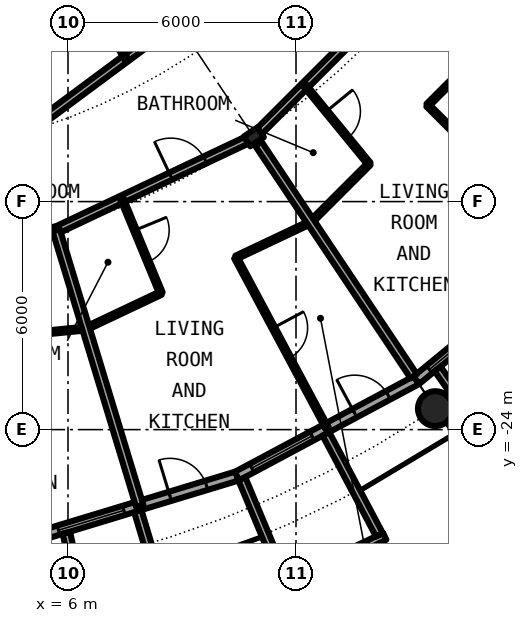
"""IFC4 building model, lengths in metres.
Left out: names, types, materials, properties, quantities, classifications, styles, units other than length and angle.
Written with IfcOpenShell. Run it as: python <this file> out.ifc"""

import sys

from ifc_helpers import new_model, si_unit, direction, frame, frame_2d, origin, origin_2d, place, context, subcontext, project, spatial, rectangle, circle, hollow_circle, i_section, extrude, element, fill, save


model = new_model("IFC4")
c1 = context("Model", 3, precision=1e-05, world=origin(), true_north=direction((0.0, 1.0)))
c2 = subcontext(c1, "Body", "Model", "MODEL_VIEW")
j1 = project(units=[si_unit("LENGTHUNIT", "METRE"), si_unit("PLANEANGLEUNIT", "RADIAN")], contexts=[c1])
p1 = place(None, origin())
s1 = spatial("IfcSite", under=j1, at=p1, CompositionType="ELEMENT")
p2 = place(p1, origin())
s2 = spatial("IfcBuilding", under=s1, at=p2, CompositionType="ELEMENT")
p3 = place(p2, frame((0.0, 0.0, 117.75)))
s3 = spatial("IfcBuildingStorey", under=s2, at=p3, CompositionType="ELEMENT", Elevation=117.75)
p4 = place(p3, frame((15.667, -23.448, 0.0), z_axis=(0.0, 0.0, 1.0), x_axis=(1.0, 0.0, 0.0)))
e1 = element("IfcColumn", 1, at=p4, inside=s3, PredefinedType="COLUMN", context=c2, shape_type="SweptSolid", body=[
    extrude(hollow_circle(Radius=0.457, WallThickness=0.04, at=origin_2d()), origin(), (0.0, 0.0, 1.0), 3.05),
])
p5 = place(p3, frame((10.889, -16.297, 0.0), z_axis=(0.0, 0.0, 1.0), x_axis=(0.55557023302, -0.831469612303, 0.0)))
e2 = element("IfcColumn", 2, at=p5, inside=s3, PredefinedType="COLUMN", context=c2, shape_type="SweptSolid", body=[
    extrude(i_section(OverallWidth=0.307, OverallDepth=0.432, WebThickness=0.021, FlangeThickness=0.04, FilletRadius=0.027, at=origin_2d()), origin(), (0.0, 0.0, 1.0), 3.05),
])
p6 = place(p3, frame((5.326, -26.775, 0.0), z_axis=(0.0, 0.0, 1.0), x_axis=(0.956965678721, 0.290201119486, 0.0)))
e3 = element("IfcWall", 3, at=p6, inside=s3, PredefinedType="SOLIDWALL", context=c2, shape_type="SweptSolid", body=[
    extrude(rectangle(XDim=5.351, YDim=0.25, at=frame_2d((2.676, 0.0))), origin(), (0.0, 0.0, 1.0), 2.7),
])
p7 = place(p6, frame((0.441, 0.0, 0.3)))
e4 = element("IfcOpeningElement", 4, at=p7, cuts=e3, PredefinedType="OPENING", context=c2, shape_type="SweptSolid", body=[
    extrude(rectangle(XDim=1.8, YDim=2.1, at=frame_2d((0.9, 1.05))), frame((0.0, 0.135, 0.0), z_axis=(0.0, -1.0, 0.0), x_axis=(1.0, 0.0, 0.0)), (0.0, 0.0, 1.0), 0.27),
])
p8 = place(p6, frame((3.51, 0.0, 0.0)))
e5 = element("IfcOpeningElement", 5, at=p8, cuts=e3, PredefinedType="OPENING", context=c2, shape_type="SweptSolid", body=[
    extrude(rectangle(XDim=1.0, YDim=2.2, at=frame_2d((0.5, 1.1))), frame((0.0, 0.135, 0.0), z_axis=(0.0, -1.0, 0.0), x_axis=(1.0, 0.0, 0.0)), (0.0, 0.0, 1.0), 0.27),
])
p9 = place(p3, frame((5.957, -26.715, -0.03), z_axis=(0.0, 0.0, 1.0), x_axis=(0.217857287091, -0.975980636315, 0.0)))
e6 = element("IfcWall", 6, at=p9, inside=s3, PredefinedType="SOLIDWALL", context=c2, shape_type="SweptSolid", body=[
    extrude(rectangle(XDim=2.928, YDim=0.2, at=frame_2d((1.464, 0.0))), origin(), (0.0, 0.0, 1.0), 2.73),
])
p10 = place(p3, frame((7.837, -26.144, -0.03), z_axis=(0.0, 0.0, 1.0), x_axis=(0.287064767992, -0.957911174889, 0.0)))
e7 = element("IfcWall", 7, at=p10, inside=s3, PredefinedType="SOLIDWALL", context=c2, shape_type="SweptSolid", body=[
    extrude(rectangle(XDim=3.006, YDim=0.2, at=frame_2d((1.503, 0.0))), origin(), (0.0, 0.0, 1.0), 2.73),
])
p11 = place(p3, frame((10.447, -25.222, 0.0), z_axis=(0.0, 0.0, 1.0), x_axis=(0.881915646801, 0.471407246368, 0.0)))
e8 = element("IfcWall", 8, at=p11, inside=s3, PredefinedType="SOLIDWALL", context=c2, shape_type="SweptSolid", body=[
    extrude(rectangle(XDim=5.352, YDim=0.25, at=frame_2d((2.676, 0.0))), origin(), (0.0, 0.0, 1.0), 2.7),
])
p12 = place(p11, frame((0.441, 0.0, 0.3)))
e9 = element("IfcOpeningElement", 9, at=p12, cuts=e8, PredefinedType="OPENING", context=c2, shape_type="SweptSolid", body=[
    extrude(rectangle(XDim=1.8, YDim=2.1, at=frame_2d((0.9, 1.05))), frame((0.0, 0.135, 0.0), z_axis=(0.0, -1.0, 0.0), x_axis=(1.0, 0.0, 0.0)), (0.0, 0.0, 1.0), 0.27),
])
p13 = place(p11, frame((3.51, 0.0, 0.0)))
e10 = element("IfcOpeningElement", 10, at=p13, cuts=e8, PredefinedType="OPENING", context=c2, shape_type="SweptSolid", body=[
    extrude(rectangle(XDim=1.0, YDim=2.2, at=frame_2d((0.5, 1.1))), frame((0.0, 0.135, 0.0), z_axis=(0.0, -1.0, 0.0), x_axis=(1.0, 0.0, 0.0)), (0.0, 0.0, 1.0), 0.27),
])
p14 = place(p3, frame((11.629, -28.088, -0.03), z_axis=(0.0, 0.0, 1.0), x_axis=(0.904000060331, 0.427532327342, 0.0)))
e11 = element("IfcWall", 11, at=p14, inside=s3, PredefinedType="SOLIDWALL", context=c2, shape_type="SweptSolid", body=[
    extrude(rectangle(XDim=2.993, YDim=0.2, at=frame_2d((1.497, 0.0))), origin(), (0.0, 0.0, 1.0), 2.73),
])
p15 = place(p14, frame((0.457, 0.0, 0.33)))
e12 = element("IfcOpeningElement", 12, at=p15, cuts=e11, PredefinedType="OPENING", context=c2, shape_type="SweptSolid", body=[
    extrude(circle(Radius=1.04, at=frame_2d((1.04, 1.04))), frame((0.0, 0.11, 0.0), z_axis=(0.0, -1.0, 0.0), x_axis=(1.0, 0.0, 0.0)), (0.0, 0.0, 1.0), 0.22),
])
p16 = place(p3, frame((10.575, -25.295, -0.03), z_axis=(0.0, 0.0, 1.0), x_axis=(0.385697364644, -0.922625353492, 0.0)))
e13 = element("IfcWall", 13, at=p16, inside=s3, PredefinedType="SOLIDWALL", context=c2, shape_type="SweptSolid", body=[
    extrude(rectangle(XDim=2.883, YDim=0.2, at=frame_2d((1.442, 0.0))), origin(), (0.0, 0.0, 1.0), 2.73),
])
p17 = place(p3, frame((12.787, -24.113, -0.03), z_axis=(0.0, 0.0, 1.0), x_axis=(0.468365282436, -0.883534924159, 0.0)))
e14 = element("IfcWall", 14, at=p17, inside=s3, PredefinedType="SOLIDWALL", context=c2, shape_type="SweptSolid", body=[
    extrude(rectangle(XDim=3.006, YDim=0.2, at=frame_2d((1.503, 0.0))), origin(), (0.0, 0.0, 1.0), 2.73),
])
p18 = place(p3, frame((15.167, -22.699, 0.0), z_axis=(0.0, 0.0, 1.0), x_axis=(0.773019449054, 0.634382322723, 0.0)))
e15 = element("IfcWall", 15, at=p18, inside=s3, PredefinedType="SOLIDWALL", context=c2, shape_type="SweptSolid", body=[
    extrude(rectangle(XDim=5.352, YDim=0.25, at=frame_2d((2.676, 0.0))), origin(), (0.0, 0.0, 1.0), 2.7),
])
p19 = place(p18, frame((0.441, 0.0, 0.3)))
e16 = element("IfcOpeningElement", 16, at=p19, cuts=e15, PredefinedType="OPENING", context=c2, shape_type="SweptSolid", body=[
    extrude(rectangle(XDim=1.8, YDim=2.1, at=frame_2d((0.9, 1.05))), frame((0.0, 0.135, 0.0), z_axis=(0.0, -1.0, 0.0), x_axis=(1.0, 0.0, 0.0)), (0.0, 0.0, 1.0), 0.27),
])
p20 = place(p18, frame((3.51, 0.0, 0.0)))
e17 = element("IfcOpeningElement", 17, at=p20, cuts=e15, PredefinedType="OPENING", context=c2, shape_type="SweptSolid", body=[
    extrude(rectangle(XDim=1.0, YDim=2.2, at=frame_2d((0.5, 1.1))), frame((0.0, 0.135, 0.0), z_axis=(0.0, -1.0, 0.0), x_axis=(1.0, 0.0, 0.0)), (0.0, 0.0, 1.0), 0.27),
])
p21 = place(p3, frame((15.726, -22.402, -0.03), z_axis=(0.0, 0.0, 1.0), x_axis=(0.574826383135, -0.818275399393, 0.0)))
e18 = element("IfcWall", 18, at=p21, inside=s3, PredefinedType="SOLIDWALL", context=c2, shape_type="SweptSolid", body=[
    extrude(rectangle(XDim=2.929, YDim=0.2, at=frame_2d((1.465, 0.0))), origin(), (0.0, 0.0, 1.0), 2.73),
])
p22 = place(p3, frame((6.473, -21.34, 0.0), z_axis=(0.0, 0.0, 1.0), x_axis=(0.903929143338, 0.427682246328, 0.0)))
e19 = element("IfcWall", 19, at=p22, inside=s3, PredefinedType="PARTITIONING", context=c2, shape_type="SweptSolid", body=[
    extrude(rectangle(XDim=2.182, YDim=0.1, at=frame_2d((1.091, 0.0))), origin(), (0.0, 0.0, 1.0), 2.7),
])
p23 = place(p3, frame((10.425, -19.47, 0.0), z_axis=(0.0, 0.0, 1.0), x_axis=(0.903951937529, 0.427634066274, 0.0)))
e20 = element("IfcWall", 20, at=p23, inside=s3, PredefinedType="PARTITIONING", context=c2, shape_type="SweptSolid", body=[
    extrude(rectangle(XDim=2.181, YDim=0.1, at=frame_2d((1.091, 0.0))), origin(), (0.0, 0.0, 1.0), 2.7),
])
p24 = place(p3, frame((4.311, -21.553, 0.0), z_axis=(0.0, 0.0, 1.0), x_axis=(0.995195976339, 0.097902853268, 0.0)))
e21 = element("IfcWall", 21, at=p24, inside=s3, PredefinedType="PARTITIONING", context=c2, shape_type="SweptSolid", body=[
    extrude(rectangle(XDim=2.175, YDim=0.1, at=frame_2d((1.087, 0.0))), origin(), (0.0, 0.0, 1.0), 2.7),
])
p25 = place(p3, frame((12.389, -18.542, 0.0), z_axis=(0.0, 0.0, 1.0), x_axis=(0.707106781187, 0.707106781187, 0.0)))
e22 = element("IfcWall", 22, at=p25, inside=s3, PredefinedType="PARTITIONING", context=c2, shape_type="SweptSolid", body=[
    extrude(rectangle(XDim=2.175, YDim=0.1, at=frame_2d((1.088, 0.0))), origin(), (0.0, 0.0, 1.0), 2.7),
])
p26 = place(p3, frame((15.468, -15.463, 0.0), z_axis=(0.0, 0.0, 1.0), x_axis=(0.707106781187, 0.707106781187, 0.0)))
e23 = element("IfcWall", 23, at=p26, inside=s3, PredefinedType="PARTITIONING", context=c2, shape_type="SweptSolid", body=[
    extrude(rectangle(XDim=4.351, YDim=0.1, at=frame_2d((2.176, 0.0))), origin(), (0.0, 0.0, 1.0), 2.7),
])
p27 = place(p26, frame((2.808, 0.0, 0.0)))
e24 = element("IfcOpeningElement", 24, at=p27, cuts=e23, PredefinedType="OPENING", context=c2, shape_type="SweptSolid", body=[
    extrude(rectangle(XDim=0.9, YDim=2.3, at=frame_2d((0.45, 1.15))), frame((0.0, 0.06, 0.0), z_axis=(0.0, -1.0, 0.0), x_axis=(1.0, 0.0, 0.0)), (0.0, 0.0, 1.0), 0.12),
])
p28 = place(p3, frame((5.686, -18.758, 0.0), z_axis=(0.0, 0.0, 1.0), x_axis=(0.903961383505, 0.427614098379, 0.0)))
e25 = element("IfcWall", 25, at=p28, inside=s3, PredefinedType="PARTITIONING", context=c2, shape_type="SweptSolid", body=[
    extrude(rectangle(XDim=5.601, YDim=0.2, at=frame_2d((2.8, 0.0))), origin(), (0.0, 0.0, 1.0), 2.39),
])
p29 = place(p28, frame((3.339, 0.0, 0.0)))
e26 = element("IfcOpeningElement", 26, at=p29, cuts=e25, PredefinedType="OPENING", context=c2, shape_type="SweptSolid", body=[
    extrude(rectangle(XDim=1.0, YDim=2.3, at=frame_2d((0.5, 1.15))), frame((0.0, 0.11, 0.0), z_axis=(0.0, -1.0, 0.0), x_axis=(1.0, 0.0, 0.0)), (0.0, 0.0, 1.0), 0.22),
])
p30 = place(p3, frame((-1.921, -19.506, 0.0), z_axis=(0.0, 0.0, 1.0), x_axis=(0.995172982325, 0.098136309541, 0.0)))
e27 = element("IfcWall", 27, at=p30, inside=s3, PredefinedType="PARTITIONING", context=c2, shape_type="SweptSolid", body=[
    extrude(rectangle(XDim=7.655, YDim=0.2, at=frame_2d((3.827, 0.0))), origin(), (0.0, 0.0, 1.0), 2.39),
])
p31 = place(p30, frame((2.368, 0.0, 0.0)))
e28 = element("IfcOpeningElement", 28, at=p31, cuts=e27, PredefinedType="OPENING", context=c2, shape_type="SweptSolid", body=[
    extrude(rectangle(XDim=1.0, YDim=2.3, at=frame_2d((0.5, 1.15))), frame((0.0, 0.11, 0.0), z_axis=(0.0, -1.0, 0.0), x_axis=(1.0, 0.0, 0.0)), (0.0, 0.0, 1.0), 0.22),
])
p32 = place(p3, frame((11.0, -16.186, 0.0), z_axis=(0.0, 0.0, 1.0), x_axis=(0.707106781187, 0.707106781187, 0.0)))
e29 = element("IfcWall", 29, at=p32, inside=s3, PredefinedType="PARTITIONING", context=c2, shape_type="SweptSolid", body=[
    extrude(rectangle(XDim=7.334, YDim=0.2, at=frame_2d((3.667, 0.0))), origin(), (0.0, 0.0, 1.0), 2.39),
])
p33 = place(p32, frame((4.123, 0.0, 0.0)))
e30 = element("IfcOpeningElement", 30, at=p33, cuts=e29, PredefinedType="OPENING", context=c2, shape_type="SweptSolid", body=[
    extrude(rectangle(XDim=1.0, YDim=2.3, at=frame_2d((0.5, 1.15))), frame((0.0, 0.11, 0.0), z_axis=(0.0, -1.0, 0.0), x_axis=(1.0, 0.0, 0.0)), (0.0, 0.0, 1.0), 0.22),
])
p34 = place(p3, frame((4.906, -16.172, 0.0), z_axis=(0.0, 0.0, 1.0), x_axis=(0.803204584823, 0.59570327758, 0.0)))
e31 = element("IfcWall", 31, at=p34, inside=s3, PredefinedType="PARTITIONING", context=c2, shape_type="SweptSolid", body=[
    extrude(rectangle(XDim=11.387, YDim=0.2, at=frame_2d((5.693, 0.0))), origin(), (0.0, 0.0, 1.0), 2.7),
])
p35 = place(p34, frame((4.38, 0.0, 0.0)))
e32 = element("IfcOpeningElement", 32, at=p35, cuts=e31, PredefinedType="OPENING", context=c2, shape_type="SweptSolid", body=[
    extrude(rectangle(XDim=1.0, YDim=2.3, at=frame_2d((0.5, 1.15))), frame((0.0, 0.11, 0.0), z_axis=(0.0, -1.0, 0.0), x_axis=(1.0, 0.0, 0.0)), (0.0, 0.0, 1.0), 0.22),
])
p36 = place(p3, frame((5.689, -18.756, 0.0), z_axis=(0.0, 0.0, 1.0), x_axis=(0.290294523619, -0.956937348815, 0.0)))
e33 = element("IfcWall", 33, at=p36, inside=s3, PredefinedType="PARTITIONING", context=c2, shape_type="SweptSolid", body=[
    extrude(rectangle(XDim=7.575, YDim=0.2, at=frame_2d((3.788, 0.0))), origin(), (0.0, 0.0, 1.0), 2.7),
])
p37 = place(p3, frame((6.316, -11.961, 0.0), z_axis=(0.0, 0.0, 1.0), x_axis=(0.467037016128, -0.884237765291, 0.0)))
e34 = element("IfcWall", 34, at=p37, inside=s3, PredefinedType="PARTITIONING", context=c2, shape_type="SweptSolid", body=[
    extrude(rectangle(XDim=2.572, YDim=0.1, at=frame_2d((1.286, 0.0))), origin(), (0.0, 0.0, 1.0), 2.7),
])
p38 = place(p3, frame((7.423, -17.936, 0.0), z_axis=(0.0, 0.0, 1.0), x_axis=(0.382195876364, -0.924081334132, 0.0)))
e35 = element("IfcWall", 35, at=p38, inside=s3, PredefinedType="PARTITIONING", context=c2, shape_type="SweptSolid", body=[
    extrude(rectangle(XDim=2.674, YDim=0.1, at=frame_2d((1.337, 0.0))), origin(), (0.0, 0.0, 1.0), 2.7),
])
p39 = place(p38, frame((0.887, 0.0, 0.0)))
e36 = element("IfcOpeningElement", 36, at=p39, cuts=e35, PredefinedType="OPENING", context=c2, shape_type="SweptSolid", body=[
    extrude(rectangle(XDim=0.9, YDim=2.3, at=frame_2d((0.45, 1.15))), frame((0.0, 0.06, 0.0), z_axis=(0.0, -1.0, 0.0), x_axis=(1.0, 0.0, 0.0)), (0.0, 0.0, 1.0), 0.12),
])
p40 = place(p3, frame((10.417, -19.474, 0.0), z_axis=(0.0, 0.0, 1.0), x_axis=(0.471755462896, -0.881729427448, 0.0)))
e37 = element("IfcWall", 37, at=p40, inside=s3, PredefinedType="PARTITIONING", context=c2, shape_type="SweptSolid", body=[
    extrude(rectangle(XDim=5.09, YDim=0.1, at=frame_2d((2.545, 0.0))), origin(), (0.0, 0.0, 1.0), 2.7),
])
p41 = place(p40, frame((2.095, 0.0, 0.0)))
e38 = element("IfcOpeningElement", 38, at=p41, cuts=e37, PredefinedType="OPENING", context=c2, shape_type="SweptSolid", body=[
    extrude(rectangle(XDim=0.9, YDim=2.3, at=frame_2d((0.45, 1.15))), frame((0.0, 0.06, 0.0), z_axis=(0.0, -1.0, 0.0), x_axis=(1.0, 0.0, 0.0)), (0.0, 0.0, 1.0), 0.12),
])
p42 = place(p3, frame((11.009, -16.477, 0.0), z_axis=(0.0, 0.0, 1.0), x_axis=(0.555664536482, -0.831406593008, 0.0)))
e39 = element("IfcWall", 39, at=p42, inside=s3, PredefinedType="PARTITIONING", context=c2, shape_type="SweptSolid", body=[
    extrude(rectangle(XDim=7.358, YDim=0.2, at=frame_2d((3.679, 0.0))), origin(), (0.0, 0.0, 1.0), 2.7),
])
p43 = place(p3, frame((12.237, -14.948, 0.0), z_axis=(0.0, 0.0, 1.0), x_axis=(0.633537478353, -0.773712002958, 0.0)))
e40 = element("IfcWall", 40, at=p43, inside=s3, PredefinedType="PARTITIONING", context=c2, shape_type="SweptSolid", body=[
    extrude(rectangle(XDim=2.661, YDim=0.1, at=frame_2d((1.331, 0.0))), origin(), (0.0, 0.0, 1.0), 2.7),
])
p44 = place(p43, frame((0.881, 0.0, 0.0)))
e41 = element("IfcOpeningElement", 41, at=p44, cuts=e40, PredefinedType="OPENING", context=c2, shape_type="SweptSolid", body=[
    extrude(rectangle(XDim=0.9, YDim=2.3, at=frame_2d((0.45, 1.15))), frame((0.0, 0.06, 0.0), z_axis=(0.0, -1.0, 0.0), x_axis=(1.0, 0.0, 0.0)), (0.0, 0.0, 1.0), 0.12),
])
p45 = place(p3, frame((15.465, -15.465, 0.0), z_axis=(0.0, 0.0, 1.0), x_axis=(0.707106781187, -0.707106781187, 0.0)))
e42 = element("IfcWall", 42, at=p45, inside=s3, PredefinedType="PARTITIONING", context=c2, shape_type="SweptSolid", body=[
    extrude(rectangle(XDim=5.305, YDim=0.1, at=frame_2d((2.652, 0.0))), origin(), (0.0, 0.0, 1.0), 2.7),
])
p46 = place(p45, frame((2.202, 0.0, 0.0)))
e43 = element("IfcOpeningElement", 43, at=p46, cuts=e42, PredefinedType="OPENING", context=c2, shape_type="SweptSolid", body=[
    extrude(rectangle(XDim=0.9, YDim=2.3, at=frame_2d((0.45, 1.15))), frame((0.0, 0.06, 0.0), z_axis=(0.0, -1.0, 0.0), x_axis=(1.0, 0.0, 0.0)), (0.0, 0.0, 1.0), 0.12),
])
p47 = place(p7, origin())
e44 = element("IfcWindow", 44, at=p47, inside=s3, PartitioningType="SINGLE_PANEL", PredefinedType="WINDOW", context=c2, shape_type="SweptSolid", body=[
    extrude(rectangle(XDim=1.8, YDim=2.1, at=frame_2d((0.9, 1.05))), frame((0.0, 0.03, 0.0), z_axis=(0.0, -1.0, 0.0), x_axis=(1.0, 0.0, 0.0)), (0.0, 0.0, 1.0), 0.06),
])
fill(e4, e44)
p48 = place(p8, origin())
e45 = element("IfcDoor", 45, at=p48, inside=s3, OperationType="SINGLE_SWING_LEFT", PredefinedType="DOOR", context=c2, shape_type="SweptSolid", body=[
    extrude(rectangle(XDim=1.0, YDim=2.2, at=frame_2d((0.5, 1.1))), frame((0.0, 0.025, 0.0), z_axis=(0.0, -1.0, 0.0), x_axis=(1.0, 0.0, 0.0)), (0.0, 0.0, 1.0), 0.05),
])
fill(e5, e45)
p49 = place(p12, origin())
e46 = element("IfcWindow", 46, at=p49, inside=s3, PartitioningType="SINGLE_PANEL", PredefinedType="WINDOW", context=c2, shape_type="SweptSolid", body=[
    extrude(rectangle(XDim=1.8, YDim=2.1, at=frame_2d((0.9, 1.05))), frame((0.0, 0.03, 0.0), z_axis=(0.0, -1.0, 0.0), x_axis=(1.0, 0.0, 0.0)), (0.0, 0.0, 1.0), 0.06),
])
fill(e9, e46)
p50 = place(p13, origin())
e47 = element("IfcDoor", 47, at=p50, inside=s3, OperationType="SINGLE_SWING_LEFT", PredefinedType="DOOR", context=c2, shape_type="SweptSolid", body=[
    extrude(rectangle(XDim=1.0, YDim=2.2, at=frame_2d((0.5, 1.1))), frame((0.0, 0.025, 0.0), z_axis=(0.0, -1.0, 0.0), x_axis=(1.0, 0.0, 0.0)), (0.0, 0.0, 1.0), 0.05),
])
fill(e10, e47)
p51 = place(p19, origin())
e48 = element("IfcWindow", 48, at=p51, inside=s3, PartitioningType="SINGLE_PANEL", PredefinedType="WINDOW", context=c2, shape_type="SweptSolid", body=[
    extrude(rectangle(XDim=1.8, YDim=2.1, at=frame_2d((0.9, 1.05))), frame((0.0, 0.03, 0.0), z_axis=(0.0, -1.0, 0.0), x_axis=(1.0, 0.0, 0.0)), (0.0, 0.0, 1.0), 0.06),
])
fill(e16, e48)
p52 = place(p29, origin())
e49 = element("IfcDoor", 49, at=p52, inside=s3, OperationType="SINGLE_SWING_RIGHT", PredefinedType="DOOR", context=c2, shape_type="SweptSolid", body=[
    extrude(rectangle(XDim=1.0, YDim=2.3, at=frame_2d((0.5, 1.15))), frame((0.0, 0.025, 0.0), z_axis=(0.0, -1.0, 0.0), x_axis=(1.0, 0.0, 0.0)), (0.0, 0.0, 1.0), 0.05),
])
fill(e26, e49)
p53 = place(p39, origin())
e50 = element("IfcDoor", 50, at=p53, inside=s3, OperationType="SINGLE_SWING_RIGHT", PredefinedType="DOOR", context=c2, shape_type="SweptSolid", body=[
    extrude(rectangle(XDim=0.9, YDim=2.3, at=frame_2d((0.45, 1.15))), frame((0.0, 0.025, 0.0), z_axis=(0.0, -1.0, 0.0), x_axis=(1.0, 0.0, 0.0)), (0.0, 0.0, 1.0), 0.05),
])
fill(e36, e50)
p54 = place(p41, origin())
e51 = element("IfcDoor", 51, at=p54, inside=s3, OperationType="SINGLE_SWING_LEFT", PredefinedType="DOOR", context=c2, shape_type="SweptSolid", body=[
    extrude(rectangle(XDim=0.9, YDim=2.3, at=frame_2d((0.45, 1.15))), frame((0.0, 0.025, 0.0), z_axis=(0.0, -1.0, 0.0), x_axis=(1.0, 0.0, 0.0)), (0.0, 0.0, 1.0), 0.05),
])
fill(e38, e51)
p55 = place(p44, origin())
e52 = element("IfcDoor", 52, at=p55, inside=s3, OperationType="SINGLE_SWING_RIGHT", PredefinedType="DOOR", context=c2, shape_type="SweptSolid", body=[
    extrude(rectangle(XDim=0.9, YDim=2.3, at=frame_2d((0.45, 1.15))), frame((0.0, 0.025, 0.0), z_axis=(0.0, -1.0, 0.0), x_axis=(1.0, 0.0, 0.0)), (0.0, 0.0, 1.0), 0.05),
])
fill(e41, e52)
save(model, sys.argv[1])
